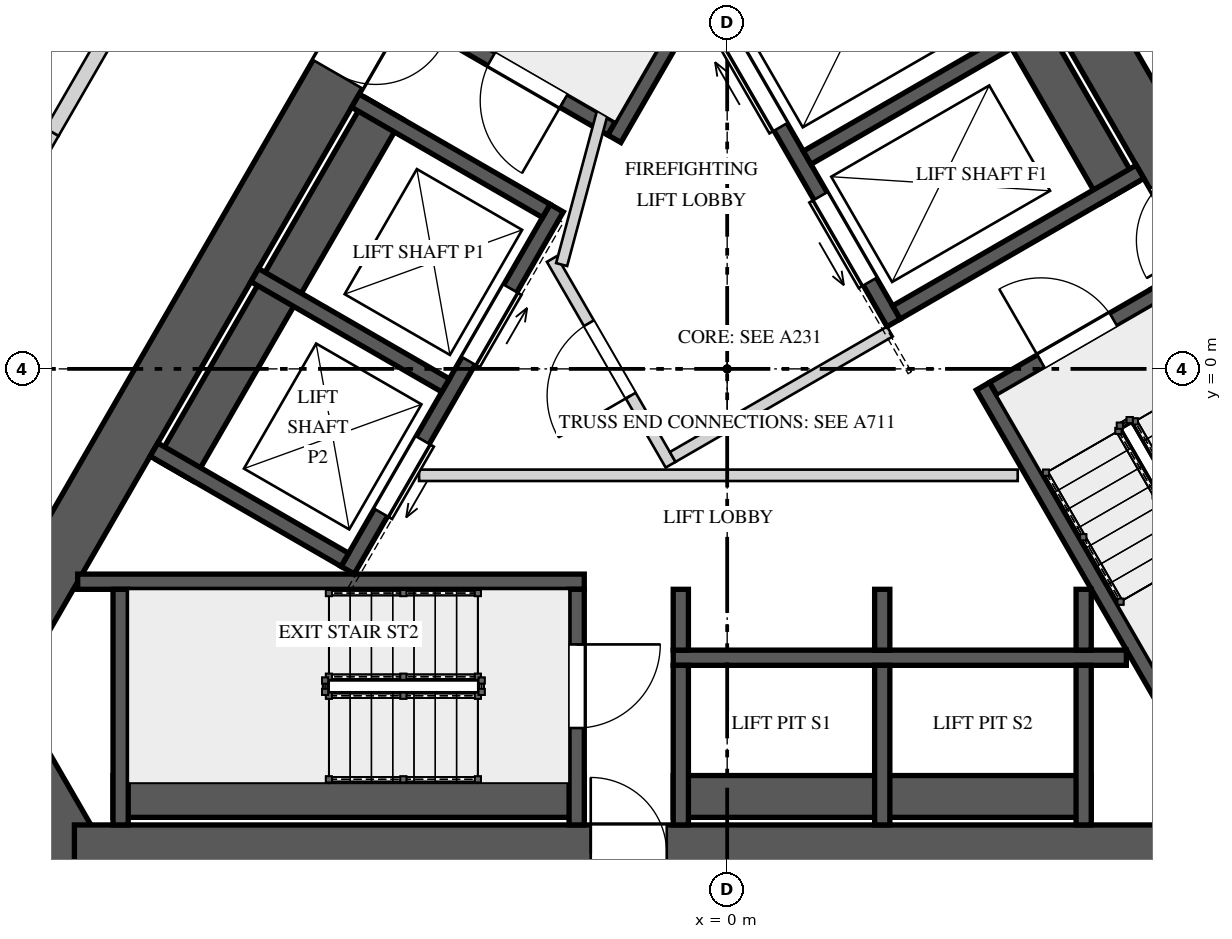
"""IFC4 building model, lengths in metres.
Left out: names, types, materials, properties, quantities, classifications, styles, units other than length and angle.
Written with IfcOpenShell. Run it as: python <this file> out.ifc"""

import sys

from ifc_helpers import new_model, si_unit, direction, frame, frame_2d, origin, place, context, subcontext, project, spatial, rectangle, extrude, element, fill, save


model = new_model("IFC4")
c1 = context("Model", 3, precision=1e-05, world=origin(), true_north=direction((0.0, 1.0)))
c2 = subcontext(c1, "Body", "Model", "MODEL_VIEW")
j1 = project(units=[si_unit("LENGTHUNIT", "METRE"), si_unit("PLANEANGLEUNIT", "RADIAN")], contexts=[c1])
p1 = place(None, origin())
s1 = spatial("IfcSite", under=j1, at=p1, CompositionType="ELEMENT")
p2 = place(p1, origin())
s2 = spatial("IfcBuilding", under=s1, at=p2, CompositionType="ELEMENT")
p3 = place(p2, frame((0.0, 0.0, 232.0)))
s3 = spatial("IfcBuildingStorey", under=s2, at=p3, CompositionType="ELEMENT", Elevation=232.0)
p4 = place(p3, frame((-1.227, 10.625, 0.0), z_axis=(0.0, 0.0, 1.0), x_axis=(-0.500002161919, -0.866024155596, 0.0)))
e1 = element("IfcWall", 1, at=p4, inside=s3, PredefinedType="SHEAR", context=c2, shape_type="SweptSolid", body=[
    extrude(rectangle(XDim=17.176, YDim=0.75, at=frame_2d((8.588, 0.0))), origin(), (0.0, 0.0, 1.0), 5.2),
])
p5 = place(p4, frame((6.793, 0.0, 0.0)))
e2 = element("IfcOpeningElement", 2, at=p5, cuts=e1, PredefinedType="OPENING", context=c2, shape_type="SweptSolid", body=[
    extrude(rectangle(XDim=1.0, YDim=2.4, at=frame_2d((0.5, 1.2))), frame((0.0, 0.385, 0.0), z_axis=(0.0, -1.0, 0.0), x_axis=(1.0, 0.0, 0.0)), (0.0, 0.0, 1.0), 0.77),
])
p6 = place(p3, frame((-9.923, -4.062, 0.0), z_axis=(0.0, 0.0, 1.0), x_axis=(0.499995765644, -0.866027848477, 0.0)))
e3 = element("IfcWall", 3, at=p6, inside=s3, PredefinedType="SHEAR", context=c2, shape_type="SweptSolid", body=[
    extrude(rectangle(XDim=2.887, YDim=0.75, at=frame_2d((1.443, 0.0))), origin(), (0.0, 0.0, 1.0), 5.2),
])
p7 = place(p3, frame((-8.588, -6.375, 0.0), z_axis=(0.0, 0.0, 1.0), x_axis=(1.0, 0.0, 0.0)))
e4 = element("IfcWall", 4, at=p7, inside=s3, PredefinedType="SHEAR", context=c2, shape_type="SweptSolid", body=[
    extrude(rectangle(XDim=17.176, YDim=0.75, at=frame_2d((8.588, 0.0))), origin(), (0.0, 0.0, 1.0), 5.2),
])
p8 = place(p7, frame((6.793, 0.0, 0.0)))
e5 = element("IfcOpeningElement", 5, at=p8, cuts=e4, PredefinedType="OPENING", context=c2, shape_type="SweptSolid", body=[
    extrude(rectangle(XDim=1.0, YDim=2.4, at=frame_2d((0.5, 1.2))), frame((0.0, 0.385, 0.0), z_axis=(0.0, -1.0, 0.0), x_axis=(1.0, 0.0, 0.0)), (0.0, 0.0, 1.0), 0.77),
])
p9 = place(p7, frame((14.864, 0.0, 0.0)))
e6 = element("IfcOpeningElement", 6, at=p9, cuts=e4, PredefinedType="OPENING", context=c2, shape_type="SweptSolid", body=[
    extrude(rectangle(XDim=0.8, YDim=2.1, at=frame_2d((0.4, 1.05))), frame((0.0, 0.385, 0.0), z_axis=(0.0, -1.0, 0.0), x_axis=(1.0, 0.0, 0.0)), (0.0, 0.0, 1.0), 0.77),
])
p10 = place(p3, frame((9.815, -4.25, 0.0), z_axis=(0.0, 0.0, 1.0), x_axis=(-0.500002161919, 0.866024155596, 0.0)))
e7 = element("IfcWall", 7, at=p10, inside=s3, PredefinedType="SHEAR", context=c2, shape_type="SweptSolid", body=[
    extrude(rectangle(XDim=17.176, YDim=0.75, at=frame_2d((8.588, 0.0))), origin(), (0.0, 0.0, 1.0), 5.2),
])
p11 = place(p10, frame((6.863, 0.0, 0.0)))
e8 = element("IfcOpeningElement", 8, at=p11, cuts=e7, PredefinedType="OPENING", context=c2, shape_type="SweptSolid", body=[
    extrude(rectangle(XDim=1.0, YDim=2.4, at=frame_2d((0.5, 1.2))), frame((0.0, 0.385, 0.0), z_axis=(0.0, -1.0, 0.0), x_axis=(1.0, 0.0, 0.0)), (0.0, 0.0, 1.0), 0.77),
])
p12 = place(p10, frame((14.382, 0.0, 0.0)))
e9 = element("IfcOpeningElement", 9, at=p12, cuts=e7, PredefinedType="OPENING", context=c2, shape_type="SweptSolid", body=[
    extrude(rectangle(XDim=0.8, YDim=2.1, at=frame_2d((0.4, 1.05))), frame((0.0, 0.385, 0.0), z_axis=(0.0, -1.0, 0.0), x_axis=(1.0, 0.0, 0.0)), (0.0, 0.0, 1.0), 0.77),
])
p13 = place(p3, frame((1.847, 8.8, 0.0), z_axis=(0.0, 0.0, 1.0), x_axis=(-0.499980354584, -0.866036745774, 0.0)))
e10 = element("IfcWall", 10, at=p13, inside=s3, PredefinedType="SOLIDWALL", context=c2, shape_type="SweptSolid", body=[
    extrude(rectangle(XDim=6.665, YDim=0.2, at=frame_2d((3.333, 0.0))), origin(), (0.0, 0.0, 1.0), 4.85),
])
p14 = place(p3, frame((-1.521, 3.165, 0.0), z_axis=(0.0, 0.0, 1.0), x_axis=(-0.86600983753, 0.500026960575, 0.0)))
e11 = element("IfcWall", 11, at=p14, inside=s3, PredefinedType="SOLIDWALL", context=c2, shape_type="SweptSolid", body=[
    extrude(rectangle(XDim=3.1, YDim=0.2, at=frame_2d((1.55, 0.0))), origin(), (0.0, 0.0, 1.0), 4.85),
])
p15 = place(p14, frame((0.725, 0.0, 0.0)))
e12 = element("IfcOpeningElement", 12, at=p15, cuts=e11, PredefinedType="OPENING", context=c2, shape_type="SweptSolid", body=[
    extrude(rectangle(XDim=1.1, YDim=2.4, at=frame_2d((0.55, 1.2))), frame((0.0, 0.11, 0.0), z_axis=(0.0, -1.0, 0.0), x_axis=(1.0, 0.0, 0.0)), (0.0, 0.0, 1.0), 0.22),
])
p16 = place(p3, frame((-8.08, -5.625, 0.0), z_axis=(0.0, 0.0, 1.0), x_axis=(1.0, 0.0, 0.0)))
e13 = element("IfcWall", 13, at=p16, inside=s3, PredefinedType="SOLIDWALL", context=c2, shape_type="SweptSolid", body=[
    extrude(rectangle(XDim=6.2, YDim=0.55, at=frame_2d((3.1, 0.0))), origin(), (0.0, 0.0, 1.0), 4.85),
])
p17 = place(p3, frame((-8.545, -2.8, 0.0), z_axis=(0.0, 0.0, 1.0), x_axis=(1.0, 0.0, 0.0)))
e14 = element("IfcWall", 14, at=p17, inside=s3, PredefinedType="SOLIDWALL", context=c2, shape_type="SweptSolid", body=[
    extrude(rectangle(XDim=6.665, YDim=0.2, at=frame_2d((3.333, 0.0))), origin(), (0.0, 0.0, 1.0), 4.85),
])
p18 = place(p3, frame((-7.98, -2.9, 0.0), z_axis=(0.0, 0.0, 1.0), x_axis=(0.0, -1.0, 0.0)))
e15 = element("IfcWall", 15, at=p18, inside=s3, PredefinedType="SOLIDWALL", context=c2, shape_type="SweptSolid", body=[
    extrude(rectangle(XDim=3.1, YDim=0.2, at=frame_2d((1.55, 0.0))), origin(), (0.0, 0.0, 1.0), 4.85),
])
p19 = place(p3, frame((-1.98, -2.9, 0.0), z_axis=(0.0, 0.0, 1.0), x_axis=(0.0, -1.0, 0.0)))
e16 = element("IfcWall", 16, at=p19, inside=s3, PredefinedType="SOLIDWALL", context=c2, shape_type="SweptSolid", body=[
    extrude(rectangle(XDim=3.1, YDim=0.2, at=frame_2d((1.55, 0.0))), origin(), (0.0, 0.0, 1.0), 4.85),
])
p20 = place(p19, frame((0.725, 0.0, 0.0)))
e17 = element("IfcOpeningElement", 17, at=p20, cuts=e16, PredefinedType="OPENING", context=c2, shape_type="SweptSolid", body=[
    extrude(rectangle(XDim=1.1, YDim=2.4, at=frame_2d((0.55, 1.2))), frame((0.0, 0.11, 0.0), z_axis=(0.0, -1.0, 0.0), x_axis=(1.0, 0.0, 0.0)), (0.0, 0.0, 1.0), 0.22),
])
p21 = place(p3, frame((8.911, -4.185, 0.0), z_axis=(0.0, 0.0, 1.0), x_axis=(-0.500009909098, 0.866019682689, 0.0)))
e18 = element("IfcWall", 18, at=p21, inside=s3, PredefinedType="SOLIDWALL", context=c2, shape_type="SweptSolid", body=[
    extrude(rectangle(XDim=6.2, YDim=0.55, at=frame_2d((3.1, 0.0))), origin(), (0.0, 0.0, 1.0), 4.85),
])
p22 = place(p3, frame((6.697, -6.0, 0.0), z_axis=(0.0, 0.0, 1.0), x_axis=(-0.499980354584, 0.866036745774, 0.0)))
e19 = element("IfcWall", 19, at=p22, inside=s3, PredefinedType="SOLIDWALL", context=c2, shape_type="SweptSolid", body=[
    extrude(rectangle(XDim=6.665, YDim=0.2, at=frame_2d((3.333, 0.0))), origin(), (0.0, 0.0, 1.0), 4.85),
])
p23 = place(p3, frame((3.501, -0.265, 0.0), z_axis=(0.0, 0.0, 1.0), x_axis=(0.866043940782, 0.499967891604, 0.0)))
e20 = element("IfcWall", 20, at=p23, inside=s3, PredefinedType="SOLIDWALL", context=c2, shape_type="SweptSolid", body=[
    extrude(rectangle(XDim=3.1, YDim=0.2, at=frame_2d((1.55, 0.0))), origin(), (0.0, 0.0, 1.0), 4.85),
])
p24 = place(p23, frame((0.725, 0.0, 0.0)))
e21 = element("IfcOpeningElement", 21, at=p24, cuts=e20, PredefinedType="OPENING", context=c2, shape_type="SweptSolid", body=[
    extrude(rectangle(XDim=1.1, YDim=2.4, at=frame_2d((0.55, 1.2))), frame((0.0, 0.11, 0.0), z_axis=(0.0, -1.0, 0.0), x_axis=(1.0, 0.0, 0.0)), (0.0, 0.0, 1.0), 0.22),
])
p25 = place(p3, frame((-2.243, 2.115, 0.0), z_axis=(0.0, 0.0, 1.0), x_axis=(-0.499996545922, -0.866027397988, 0.0)))
e22 = element("IfcWall", 22, at=p25, inside=s3, PredefinedType="SOLIDWALL", context=c2, shape_type="SweptSolid", body=[
    extrude(rectangle(XDim=5.5, YDim=0.2, at=frame_2d((2.75, 0.0))), origin(), (0.0, 0.0, 1.0), 4.85),
])
p26 = place(p25, frame((1.22, 0.0, 0.0)))
e23 = element("IfcOpeningElement", 23, at=p26, cuts=e22, PredefinedType="OPENING", context=c2, shape_type="SweptSolid", body=[
    extrude(rectangle(XDim=1.1, YDim=2.1, at=frame_2d((0.55, 1.05))), frame((0.0, 0.11, 0.0), z_axis=(0.0, -1.0, 0.0), x_axis=(1.0, 0.0, 0.0)), (0.0, 0.0, 1.0), 0.22),
])
p27 = place(p25, frame((3.525, 0.0, 0.0)))
e24 = element("IfcOpeningElement", 24, at=p27, cuts=e22, PredefinedType="OPENING", context=c2, shape_type="SweptSolid", body=[
    extrude(rectangle(XDim=1.1, YDim=2.1, at=frame_2d((0.55, 1.05))), frame((0.0, 0.11, 0.0), z_axis=(0.0, -1.0, 0.0), x_axis=(1.0, 0.0, 0.0)), (0.0, 0.0, 1.0), 0.22),
])
p28 = place(p3, frame((-4.516, 3.427, 0.0), z_axis=(0.0, 0.0, 1.0), x_axis=(-0.499996545922, -0.866027397988, 0.0)))
e25 = element("IfcWall", 25, at=p28, inside=s3, PredefinedType="SOLIDWALL", context=c2, shape_type="SweptSolid", body=[
    extrude(rectangle(XDim=5.5, YDim=0.55, at=frame_2d((2.75, 0.0))), origin(), (0.0, 0.0, 1.0), 4.85),
])
p29 = place(p3, frame((-2.38, 2.078, 0.0), z_axis=(0.0, 0.0, 1.0), x_axis=(-0.866032775405, 0.499987231761, 0.0)))
e26 = element("IfcWall", 26, at=p29, inside=s3, PredefinedType="SOLIDWALL", context=c2, shape_type="SweptSolid", body=[
    extrude(rectangle(XDim=2.9, YDim=0.2, at=frame_2d((1.45, 0.0))), origin(), (0.0, 0.0, 1.0), 4.85),
])
p30 = place(p3, frame((-3.705, -0.217, 0.0), z_axis=(0.0, 0.0, 1.0), x_axis=(-0.865996321171, 0.50005036918, 0.0)))
e27 = element("IfcWall", 27, at=p30, inside=s3, PredefinedType="SOLIDWALL", context=c2, shape_type="SweptSolid", body=[
    extrude(rectangle(XDim=2.9, YDim=0.2, at=frame_2d((1.45, 0.0))), origin(), (0.0, 0.0, 1.0), 4.85),
])
p31 = place(p3, frame((-5.03, -2.512, 0.0), z_axis=(0.0, 0.0, 1.0), x_axis=(-0.866032775405, 0.499987231761, 0.0)))
e28 = element("IfcWall", 28, at=p31, inside=s3, PredefinedType="SOLIDWALL", context=c2, shape_type="SweptSolid", body=[
    extrude(rectangle(XDim=2.9, YDim=0.2, at=frame_2d((1.45, 0.0))), origin(), (0.0, 0.0, 1.0), 4.85),
])
p32 = place(p3, frame((-0.71, -3.8, 0.0), z_axis=(0.0, 0.0, 1.0), x_axis=(1.0, 0.0, 0.0)))
e29 = element("IfcWall", 29, at=p32, inside=s3, PredefinedType="SOLIDWALL", context=c2, shape_type="SweptSolid", body=[
    extrude(rectangle(XDim=5.961, YDim=0.2, at=frame_2d((2.981, 0.0))), origin(), (0.0, 0.0, 1.0), 4.85),
])
p33 = place(p3, frame((-0.71, -5.625, 0.0), z_axis=(0.0, 0.0, 1.0), x_axis=(1.0, 0.0, 0.0)))
e30 = element("IfcWall", 30, at=p33, inside=s3, PredefinedType="SOLIDWALL", context=c2, shape_type="SweptSolid", body=[
    extrude(rectangle(XDim=5.5, YDim=0.55, at=frame_2d((2.75, 0.0))), origin(), (0.0, 0.0, 1.0), 4.85),
])
p34 = place(p3, frame((-0.61, -3.9, 0.0), z_axis=(0.0, 0.0, 1.0), x_axis=(0.0, -1.0, 0.0)))
e31 = element("IfcWall", 31, at=p34, inside=s3, PredefinedType="SOLIDWALL", context=c2, shape_type="SweptSolid", body=[
    extrude(rectangle(XDim=2.1, YDim=0.2, at=frame_2d((1.05, 0.0))), origin(), (0.0, 0.0, 1.0), 4.85),
])
p35 = place(p3, frame((-0.61, -2.9, 0.0), z_axis=(0.0, 0.0, 1.0), x_axis=(0.0, -1.0, 0.0)))
e32 = element("IfcWall", 32, at=p35, inside=s3, PredefinedType="SOLIDWALL", context=c2, shape_type="SweptSolid", body=[
    extrude(rectangle(XDim=0.8, YDim=0.2, at=frame_2d((0.4, 0.0))), origin(), (0.0, 0.0, 1.0), 4.85),
])
p36 = place(p3, frame((2.04, -3.9, 0.0), z_axis=(0.0, 0.0, 1.0), x_axis=(0.0, -1.0, 0.0)))
e33 = element("IfcWall", 33, at=p36, inside=s3, PredefinedType="SOLIDWALL", context=c2, shape_type="SweptSolid", body=[
    extrude(rectangle(XDim=2.1, YDim=0.2, at=frame_2d((1.05, 0.0))), origin(), (0.0, 0.0, 1.0), 4.85),
])
p37 = place(p3, frame((2.04, -2.9, 0.0), z_axis=(0.0, 0.0, 1.0), x_axis=(0.0, -1.0, 0.0)))
e34 = element("IfcWall", 34, at=p37, inside=s3, PredefinedType="SOLIDWALL", context=c2, shape_type="SweptSolid", body=[
    extrude(rectangle(XDim=0.8, YDim=0.2, at=frame_2d((0.4, 0.0))), origin(), (0.0, 0.0, 1.0), 4.85),
])
p38 = place(p3, frame((4.69, -3.9, 0.0), z_axis=(0.0, 0.0, 1.0), x_axis=(0.0, -1.0, 0.0)))
e35 = element("IfcWall", 35, at=p38, inside=s3, PredefinedType="SOLIDWALL", context=c2, shape_type="SweptSolid", body=[
    extrude(rectangle(XDim=2.1, YDim=0.2, at=frame_2d((1.05, 0.0))), origin(), (0.0, 0.0, 1.0), 4.85),
])
p39 = place(p3, frame((4.69, -2.9, 0.0), z_axis=(0.0, 0.0, 1.0), x_axis=(0.0, -1.0, 0.0)))
e36 = element("IfcWall", 36, at=p39, inside=s3, PredefinedType="SOLIDWALL", context=c2, shape_type="SweptSolid", body=[
    extrude(rectangle(XDim=0.8, YDim=0.2, at=frame_2d((0.4, 0.0))), origin(), (0.0, 0.0, 1.0), 4.85),
])
p40 = place(p3, frame((2.19, 0.606, 0.0), z_axis=(0.0, 0.0, 1.0), x_axis=(-0.500002801628, 0.866023786258, 0.0)))
e37 = element("IfcWall", 37, at=p40, inside=s3, PredefinedType="SOLIDWALL", context=c2, shape_type="SweptSolid", body=[
    extrude(rectangle(XDim=4.9, YDim=0.2, at=frame_2d((2.45, 0.0))), origin(), (0.0, 0.0, 1.0), 4.85),
])
p41 = place(p40, frame((0.625, 0.0, 0.0)))
e38 = element("IfcOpeningElement", 38, at=p41, cuts=e37, PredefinedType="OPENING", context=c2, shape_type="SweptSolid", body=[
    extrude(rectangle(XDim=1.3, YDim=2.1, at=frame_2d((0.65, 1.05))), frame((0.0, 0.11, 0.0), z_axis=(0.0, -1.0, 0.0), x_axis=(1.0, 0.0, 0.0)), (0.0, 0.0, 1.0), 0.22),
])
p42 = place(p40, frame((2.975, 0.0, 0.0)))
e39 = element("IfcOpeningElement", 39, at=p42, cuts=e37, PredefinedType="OPENING", context=c2, shape_type="SweptSolid", body=[
    extrude(rectangle(XDim=1.3, YDim=2.1, at=frame_2d((0.65, 1.05))), frame((0.0, 0.11, 0.0), z_axis=(0.0, -1.0, 0.0), x_axis=(1.0, 0.0, 0.0)), (0.0, 0.0, 1.0), 0.22),
])
p43 = place(p3, frame((5.156, 2.319, 0.0), z_axis=(0.0, 0.0, 1.0), x_axis=(-0.500018594424, 0.866014668023, 0.0)))
e40 = element("IfcWall", 40, at=p43, inside=s3, PredefinedType="SOLIDWALL", context=c2, shape_type="SweptSolid", body=[
    extrude(rectangle(XDim=4.9, YDim=0.55, at=frame_2d((2.45, 0.0))), origin(), (0.0, 0.0, 1.0), 4.85),
])
for number, where, z_axis, x_axis in (
    (41, (2.227, 0.743, 0.0), (0.0, 0.0, 1.0), (0.866, 0.5, 0.0)),
    (42, (1.052, 2.778, 0.0), (0.0, 0.0, 1.0), (0.866, 0.5, 0.0)),
):
    element("IfcWall", number, at=place(p3, frame(where, z_axis=z_axis, x_axis=x_axis)), inside=s3, PredefinedType="SOLIDWALL", context=c2, shape_type="SweptSolid", body=[
        extrude(rectangle(XDim=3.7, YDim=0.2, at=frame_2d((1.85, 0.0))), origin(), (0.0, 0.0, 1.0), 4.85),
    ])
p44 = place(p3, frame((-0.744, -1.261, 0.0), z_axis=(0.0, 0.0, 1.0), x_axis=(-0.500004234368, 0.866022959057, 0.0)))
e43 = element("IfcWall", 43, at=p44, inside=s3, PredefinedType="PARTITIONING", context=c2, shape_type="SweptSolid", body=[
    extrude(rectangle(XDim=3.125, YDim=0.15, at=frame_2d((1.562, 0.0))), origin(), (0.0, 0.0, 1.0), 4.85),
])
p45 = place(p44, frame((1.05, 0.0, 0.0)))
e44 = element("IfcOpeningElement", 44, at=p45, cuts=e43, PredefinedType="OPENING", context=c2, shape_type="SweptSolid", body=[
    extrude(rectangle(XDim=1.1, YDim=2.4, at=frame_2d((0.55, 1.2))), frame((0.0, 0.085, 0.0), z_axis=(0.0, -1.0, 0.0), x_axis=(1.0, 0.0, 0.0)), (0.0, 0.0, 1.0), 0.17),
])
p46 = place(p3, frame((-0.717, -1.159, 0.0), z_axis=(0.0, 0.0, 1.0), x_axis=(0.866008176907, 0.50002983664, 0.0)))
e45 = element("IfcWall", 45, at=p46, inside=s3, PredefinedType="PARTITIONING", context=c2, shape_type="SweptSolid", body=[
    extrude(rectangle(XDim=3.3, YDim=0.15, at=frame_2d((1.65, 0.0))), origin(), (0.0, 0.0, 1.0), 4.85),
])
p47 = place(p3, frame((-2.178, 1.372, 0.0), z_axis=(0.0, 0.0, 1.0), x_axis=(0.258808958833, 0.96592852884, 0.0)))
e46 = element("IfcWall", 46, at=p47, inside=s3, PredefinedType="PARTITIONING", context=c2, shape_type="SweptSolid", body=[
    extrude(rectangle(XDim=2.903, YDim=0.15, at=frame_2d((1.451, 0.0))), origin(), (0.0, 0.0, 1.0), 4.85),
])
p48 = place(p3, frame((-1.51, 4.215, 0.0), z_axis=(0.0, 0.0, 1.0), x_axis=(0.866085525409, 0.49989585183, 0.0)))
e47 = element("IfcWall", 47, at=p48, inside=s3, PredefinedType="PARTITIONING", context=c2, shape_type="SweptSolid", body=[
    extrude(rectangle(XDim=1.3, YDim=0.15, at=frame_2d((0.65, 0.0))), origin(), (0.0, 0.0, 1.0), 4.85),
])
p49 = place(p3, frame((-4.053, -1.4, 0.0), z_axis=(0.0, 0.0, 1.0), x_axis=(1.0, 0.0, 0.0)))
e48 = element("IfcWall", 48, at=p49, inside=s3, PredefinedType="PARTITIONING", context=c2, shape_type="SweptSolid", body=[
    extrude(rectangle(XDim=7.876, YDim=0.15, at=frame_2d((3.938, 0.0))), origin(), (0.0, 0.0, 1.0), 4.85),
])
p50 = place(p3, frame((-9.293, 2.404, 0.0), z_axis=(0.0, 0.0, 1.0), x_axis=(0.500039835994, 0.866002403241, 0.0)))
e49 = element("IfcWall", 49, at=p50, inside=s3, PredefinedType="SOLIDWALL", context=c2, shape_type="SweptSolid", body=[
    extrude(rectangle(XDim=0.821, YDim=0.2, at=frame_2d((0.411, 0.0))), origin(), (0.0, 0.0, 1.0), 3.95),
])
p51 = place(p3, frame((-8.882, 3.115, 0.0), z_axis=(0.0, 0.0, 1.0), x_axis=(0.500006198144, 0.866021825255, 0.0)))
e50 = element("IfcWall", 50, at=p51, inside=s3, PredefinedType="SOLIDWALL", context=c2, shape_type="SweptSolid", body=[
    extrude(rectangle(XDim=5.636, YDim=0.2, at=frame_2d((2.818, 0.0))), origin(), (0.0, 0.0, 1.0), 4.85),
])
p52 = place(p15, origin())
e51 = element("IfcDoor", 51, at=p52, inside=s3, OperationType="SINGLE_SWING_RIGHT", PredefinedType="DOOR", context=c2, shape_type="SweptSolid", body=[
    extrude(rectangle(XDim=1.1, YDim=2.4, at=frame_2d((0.55, 1.2))), frame((0.0, 0.025, 0.0), z_axis=(0.0, -1.0, 0.0), x_axis=(1.0, 0.0, 0.0)), (0.0, 0.0, 1.0), 0.05),
])
fill(e12, e51)
p53 = place(p20, origin())
e52 = element("IfcDoor", 52, at=p53, inside=s3, OperationType="SINGLE_SWING_LEFT", PredefinedType="DOOR", context=c2, shape_type="SweptSolid", body=[
    extrude(rectangle(XDim=1.1, YDim=2.4, at=frame_2d((0.55, 1.2))), frame((0.0, 0.025, 0.0), z_axis=(0.0, -1.0, 0.0), x_axis=(1.0, 0.0, 0.0)), (0.0, 0.0, 1.0), 0.05),
])
fill(e17, e52)
p54 = place(p24, origin())
e53 = element("IfcDoor", 53, at=p54, inside=s3, OperationType="SINGLE_SWING_RIGHT", PredefinedType="DOOR", context=c2, shape_type="SweptSolid", body=[
    extrude(rectangle(XDim=1.1, YDim=2.4, at=frame_2d((0.55, 1.2))), frame((0.0, 0.025, 0.0), z_axis=(0.0, -1.0, 0.0), x_axis=(1.0, 0.0, 0.0)), (0.0, 0.0, 1.0), 0.05),
])
fill(e21, e53)
p55 = place(p26, origin())
e54 = element("IfcDoor", 54, at=p55, inside=s3, OperationType="SLIDING_TO_LEFT", PredefinedType="DOOR", context=c2, shape_type="SweptSolid", body=[
    extrude(rectangle(XDim=1.1, YDim=2.1, at=frame_2d((0.55, 1.05))), frame((0.0, 0.025, 0.0), z_axis=(0.0, -1.0, 0.0), x_axis=(1.0, 0.0, 0.0)), (0.0, 0.0, 1.0), 0.05),
])
fill(e23, e54)
p56 = place(p27, origin())
e55 = element("IfcDoor", 55, at=p56, inside=s3, OperationType="SLIDING_TO_RIGHT", PredefinedType="DOOR", context=c2, shape_type="SweptSolid", body=[
    extrude(rectangle(XDim=1.1, YDim=2.1, at=frame_2d((0.55, 1.05))), frame((0.0, 0.025, 0.0), z_axis=(0.0, -1.0, 0.0), x_axis=(1.0, 0.0, 0.0)), (0.0, 0.0, 1.0), 0.05),
])
fill(e24, e55)
p57 = place(p41, origin())
e56 = element("IfcDoor", 56, at=p57, inside=s3, OperationType="SLIDING_TO_LEFT", PredefinedType="DOOR", context=c2, shape_type="SweptSolid", body=[
    extrude(rectangle(XDim=1.3, YDim=2.1, at=frame_2d((0.65, 1.05))), frame((0.0, 0.025, 0.0), z_axis=(0.0, -1.0, 0.0), x_axis=(1.0, 0.0, 0.0)), (0.0, 0.0, 1.0), 0.05),
])
fill(e38, e56)
p58 = place(p42, origin())
e57 = element("IfcDoor", 57, at=p58, inside=s3, OperationType="SLIDING_TO_RIGHT", PredefinedType="DOOR", context=c2, shape_type="SweptSolid", body=[
    extrude(rectangle(XDim=1.3, YDim=2.1, at=frame_2d((0.65, 1.05))), frame((0.0, 0.025, 0.0), z_axis=(0.0, -1.0, 0.0), x_axis=(1.0, 0.0, 0.0)), (0.0, 0.0, 1.0), 0.05),
])
fill(e39, e57)
p59 = place(p45, origin())
e58 = element("IfcDoor", 58, at=p59, inside=s3, OperationType="SINGLE_SWING_LEFT", PredefinedType="DOOR", context=c2, shape_type="SweptSolid", body=[
    extrude(rectangle(XDim=1.1, YDim=2.4, at=frame_2d((0.55, 1.2))), frame((0.0, 0.025, 0.0), z_axis=(0.0, -1.0, 0.0), x_axis=(1.0, 0.0, 0.0)), (0.0, 0.0, 1.0), 0.05),
])
fill(e44, e58)
p60 = place(p5, origin())
e59 = element("IfcDoor", 59, at=p60, inside=s3, OperationType="SINGLE_SWING_RIGHT", PredefinedType="DOOR", context=c2, shape_type="SweptSolid", body=[
    extrude(rectangle(XDim=1.0, YDim=2.4, at=frame_2d((0.5, 1.2))), frame((0.0, 0.025, 0.0), z_axis=(0.0, -1.0, 0.0), x_axis=(1.0, 0.0, 0.0)), (0.0, 0.0, 1.0), 0.05),
])
fill(e2, e59)
p61 = place(p8, origin())
e60 = element("IfcDoor", 60, at=p61, inside=s3, OperationType="SINGLE_SWING_LEFT", PredefinedType="DOOR", context=c2, shape_type="SweptSolid", body=[
    extrude(rectangle(XDim=1.0, YDim=2.4, at=frame_2d((0.5, 1.2))), frame((0.0, 0.025, 0.0), z_axis=(0.0, -1.0, 0.0), x_axis=(1.0, 0.0, 0.0)), (0.0, 0.0, 1.0), 0.05),
])
fill(e5, e60)
save(model, sys.argv[1])
